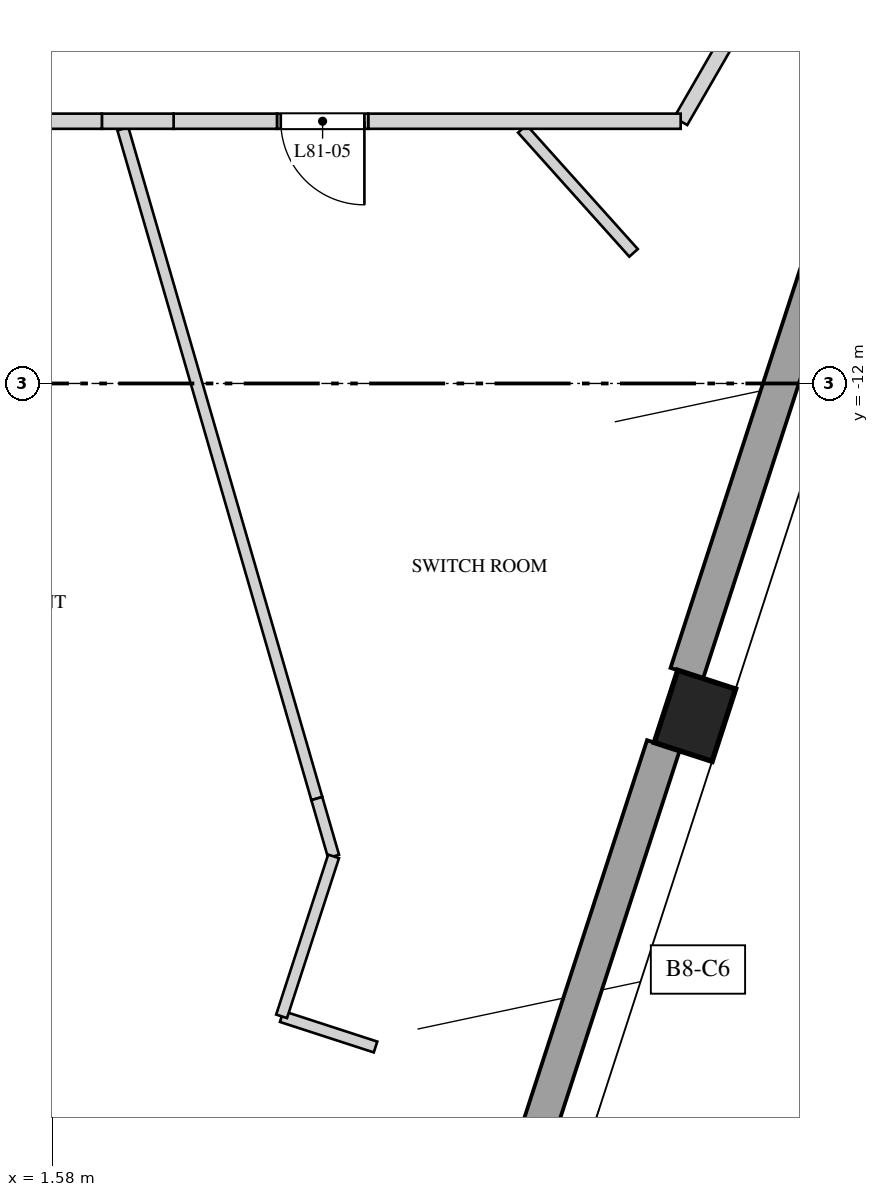
"""IFC4 building model, lengths in metres.
Left out: names, types, materials, properties, quantities, classifications, styles, units other than length and angle.
Written with IfcOpenShell. Run it as: python <this file> out.ifc"""

import sys

from ifc_helpers import new_model, si_unit, direction, frame, frame_2d, origin, origin_2d, place, context, subcontext, project, spatial, polyline, rectangle, outline, extrude, element, fill, save


model = new_model("IFC4")
c1 = context("Model", 3, precision=1e-05, world=origin(), true_north=direction((0.0, 1.0)))
c2 = subcontext(c1, "Body", "Model", "MODEL_VIEW")
j1 = project(units=[si_unit("LENGTHUNIT", "METRE"), si_unit("PLANEANGLEUNIT", "RADIAN")], contexts=[c1])
p1 = place(None, origin())
s1 = spatial("IfcSite", under=j1, at=p1, CompositionType="ELEMENT")
p2 = place(p1, origin())
s2 = spatial("IfcBuilding", under=s1, at=p2, CompositionType="ELEMENT")
p3 = place(p2, frame((0.0, 0.0, 352.4)))
s3 = spatial("IfcBuildingStorey", under=s2, at=p3, CompositionType="ELEMENT", Elevation=352.4)
p4 = place(p3, frame((10.032, -16.372, 0.0), z_axis=(0.0, 0.0, 1.0), x_axis=(0.309016994375, 0.951056516295, 0.0)))
e1 = element("IfcColumn", 1, at=p4, inside=s3, PredefinedType="COLUMN", context=c2, shape_type="SweptSolid", body=[
    extrude(rectangle(XDim=1.0, YDim=0.8, at=origin_2d()), origin(), (0.0, 0.0, 1.0), 4.5),
])
for number, where, z_axis, x_axis in (
    (2, (-1.966, -19.224, 0.0), (0.0, 0.0, 1.0), (0.669, -0.743, 0.0)),
    (3, (7.541, -23.148, 0.0), (0.0, 0.0, 1.0), (0.309, 0.951, 0.0)),
):
    element("IfcWall", number, at=place(p3, frame(where, z_axis=z_axis, x_axis=x_axis)), inside=s3, PredefinedType="SOLIDWALL", context=c2, shape_type="SweptSolid", body=[
        extrude(rectangle(XDim=6.714, YDim=0.45, at=frame_2d((3.357, 0.0))), origin(), (0.0, 0.0, 1.0), 3.8),
    ])
p5 = place(p3, frame((9.925, -15.812, 0.0), z_axis=(0.0, 0.0, 1.0), x_axis=(0.309008326872, 0.951059332494, 0.0)))
e4 = element("IfcWall", 4, at=p5, inside=s3, PredefinedType="SOLIDWALL", context=c2, shape_type="SweptSolid", body=[
    extrude(rectangle(XDim=7.314, YDim=0.45, at=frame_2d((3.657, 0.0))), origin(), (0.0, 0.0, 1.0), 3.8),
])
p6 = place(p3, frame((2.505, -8.65, 0.0), z_axis=(0.0, 0.0, 1.0), x_axis=(0.278185386407, -0.960527402415, 0.0)))
e5 = element("IfcWall", 5, at=p6, inside=s3, PredefinedType="PARTITIONING", context=c2, shape_type="SweptSolid", body=[
    extrude(rectangle(XDim=9.173, YDim=0.15, at=frame_2d((4.586, 0.0))), origin(), (0.0, 0.0, 1.0), 3.05),
])
p7 = place(p3, frame((5.057, -17.461, 0.0), z_axis=(0.0, 0.0, 1.0), x_axis=(0.278222842465, -0.960516553699, 0.0)))
e6 = element("IfcWall", 6, at=p7, inside=s3, PredefinedType="PARTITIONING", context=c2, shape_type="SweptSolid", body=[
    extrude(rectangle(XDim=0.792, YDim=0.15, at=frame_2d((0.396, 0.0))), origin(), (0.0, 0.0, 1.0), 4.15),
])
p8 = place(p3, frame((4.595, -20.328, 0.0), z_axis=(0.0, 0.0, 1.0), x_axis=(0.951063088132, -0.308996767609, 0.0)))
e7 = element("IfcWall", 7, at=p8, inside=s3, PredefinedType="PARTITIONING", context=c2, shape_type="SweptSolid", body=[
    extrude(rectangle(XDim=1.298, YDim=0.15, at=frame_2d((0.649, 0.0))), origin(), (0.0, 0.0, 1.0), 4.15),
])
p9 = place(p3, frame((5.277, -18.221, 0.0), z_axis=(0.0, 0.0, 1.0), x_axis=(-0.309036176758, -0.951050283347, 0.0)))
e8 = element("IfcWall", 8, at=p9, inside=s3, PredefinedType="PARTITIONING", context=c2, shape_type="SweptSolid", body=[
    extrude(rectangle(XDim=2.213, YDim=0.15, at=frame_2d((1.106, 0.0))), origin(), (0.0, 0.0, 1.0), 4.15),
])
p10 = place(p3, frame((7.76, -8.65, 0.0), z_axis=(0.0, 0.0, 1.0), x_axis=(0.667813245051, -0.744328872028, 0.0)))
e9 = element("IfcWall", 9, at=p10, inside=s3, PredefinedType="PARTITIONING", context=c2, shape_type="SweptSolid", body=[
    extrude(rectangle(XDim=2.192, YDim=0.15, at=frame_2d((1.096, 0.0))), origin(), (0.0, 0.0, 1.0), 4.15),
])
p11 = place(p3, frame((10.474, -7.458, 0.0), z_axis=(0.0, 0.0, 1.0), x_axis=(-0.499929168788, -0.866066294342, 0.0)))
e10 = element("IfcWall", 10, at=p11, inside=s3, PredefinedType="SOLIDWALL", context=c2, shape_type="SweptSolid", body=[
    extrude(rectangle(XDim=1.261, YDim=0.2, at=frame_2d((0.63, 0.0))), origin(), (0.0, 0.0, 1.0), 4.15),
])
p12 = place(p3, frame((9.844, -8.55, 0.0), z_axis=(0.0, 0.0, 1.0), x_axis=(-1.0, 0.0, 0.0)))
e11 = element("IfcWall", 11, at=p12, inside=s3, PredefinedType="SOLIDWALL", context=c2, shape_type="SweptSolid", body=[
    extrude(rectangle(XDim=4.111, YDim=0.2, at=frame_2d((2.055, 0.0))), origin(), (0.0, 0.0, 1.0), 4.15),
])
p13 = place(p3, frame((5.733, -8.55, 0.0), z_axis=(0.0, 0.0, 1.0), x_axis=(-1.0, 0.0, 0.0)))
e12 = element("IfcWall", 12, at=p13, inside=s3, PredefinedType="SOLIDWALL", context=c2, shape_type="SweptSolid", body=[
    extrude(outline(polyline([(0.0, 0.0), (1.2, 0.0), (1.2, 4.15), (0.905, 4.15), (0.905, 3.45), (0.0, 3.45), (0.0, 0.0)])), frame((0.0, 0.1, 0.0), z_axis=(0.0, -1.0, 0.0), x_axis=(1.0, 0.0, 0.0)), (0.0, 0.0, 1.0), 0.2),
])
p14 = place(p13, frame((0.05, 0.0, 0.0)))
e13 = element("IfcOpeningElement", 13, at=p14, cuts=e12, PredefinedType="OPENING", context=c2, shape_type="SweptSolid", body=[
    extrude(rectangle(XDim=1.1, YDim=2.4, at=frame_2d((0.55, 1.2))), frame((0.0, 0.11, 0.0), z_axis=(0.0, -1.0, 0.0), x_axis=(1.0, 0.0, 0.0)), (0.0, 0.0, 1.0), 0.22),
])
p15 = place(p3, frame((4.533, -8.55, 0.0), z_axis=(0.0, 0.0, 1.0), x_axis=(-1.0, 0.0, 0.0)))
e14 = element("IfcWall", 14, at=p15, inside=s3, PredefinedType="SOLIDWALL", context=c2, shape_type="SweptSolid", body=[
    extrude(rectangle(XDim=1.36, YDim=0.2, at=frame_2d((0.68, 0.0))), origin(), (0.0, 0.0, 1.0), 4.15),
])
p16 = place(p3, frame((3.173, -8.55, 0.0), z_axis=(0.0, 0.0, 1.0), x_axis=(-1.0, 0.0, 0.0)))
e15 = element("IfcWall", 15, at=p16, inside=s3, PredefinedType="SOLIDWALL", context=c2, shape_type="SweptSolid", body=[
    extrude(rectangle(XDim=0.944, YDim=0.2, at=frame_2d((0.472, 0.0))), origin(), (0.0, 0.0, 1.0), 3.05),
])
p17 = place(p3, frame((2.229, -8.55, 0.0), z_axis=(0.0, 0.0, 1.0), x_axis=(-1.0, 0.0, 0.0)))
e16 = element("IfcWall", 16, at=p17, inside=s3, PredefinedType="SOLIDWALL", context=c2, shape_type="SweptSolid", body=[
    extrude(rectangle(XDim=0.807, YDim=0.2, at=frame_2d((0.403, 0.0))), origin(), (0.0, 0.0, 1.0), 4.15),
])
p18 = place(p14, origin())
e17 = element("IfcDoor", 17, at=p18, inside=s3, OperationType="SINGLE_SWING_LEFT", PredefinedType="DOOR", context=c2, shape_type="SweptSolid", body=[
    extrude(rectangle(XDim=1.1, YDim=2.4, at=frame_2d((0.55, 1.2))), frame((0.0, 0.025, 0.0), z_axis=(0.0, -1.0, 0.0), x_axis=(1.0, 0.0, 0.0)), (0.0, 0.0, 1.0), 0.05),
])
fill(e13, e17)
save(model, sys.argv[1])
